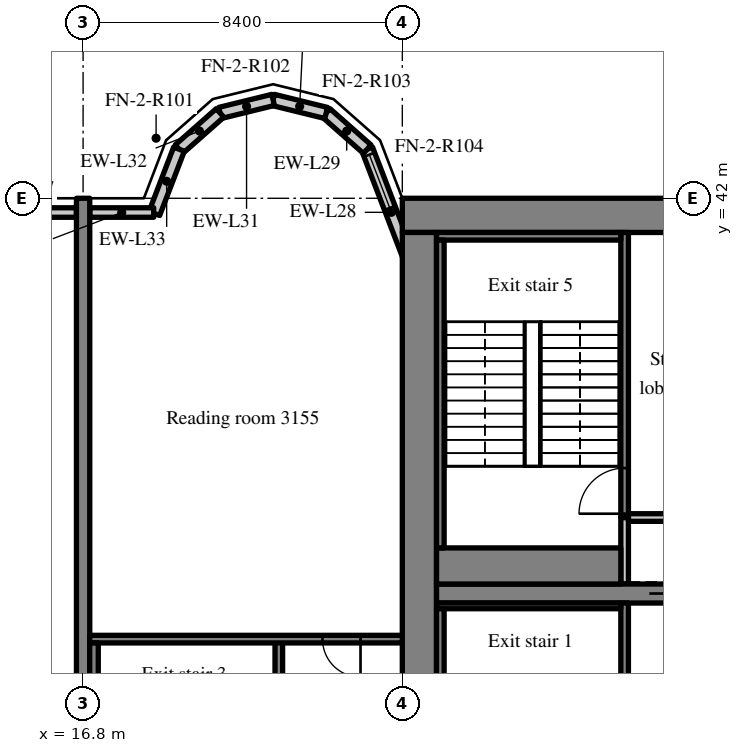
"""IFC4 building model, lengths in metres.
Left out: names, types, materials, properties, quantities, classifications, styles, units other than length and angle.
Written with IfcOpenShell. Run it as: python <this file> out.ifc"""

import sys

from ifc_helpers import new_model, si_unit, direction, frame, frame_2d, origin, place, context, subcontext, project, spatial, rectangle, extrude, source, transform, mapped, element, fill, save


model = new_model("IFC4")
c1 = context("Model", 3, precision=1e-05, world=origin(), true_north=direction((0.0, 1.0)))
c2 = subcontext(c1, "Body", "Model", "MODEL_VIEW")
j1 = project(units=[si_unit("LENGTHUNIT", "METRE"), si_unit("PLANEANGLEUNIT", "RADIAN")], contexts=[c1])
p1 = place(None, origin())
s1 = spatial("IfcSite", under=j1, at=p1, CompositionType="ELEMENT")
p2 = place(p1, origin())
s2 = spatial("IfcBuilding", under=s1, at=p2, CompositionType="ELEMENT")
p3 = place(p2, frame((0.0, 0.0, 129.4)))
s3 = spatial("IfcBuildingStorey", under=s2, at=p3, CompositionType="ELEMENT", Elevation=129.4)
m1 = source(origin(), c2, "Body", "SweptSolid", [
    extrude(rectangle(XDim=50.4, YDim=0.9, at=frame_2d((25.2, 0.0))), origin(), (0.0, 0.0, 1.0), 3.52),
])
p4 = place(p3, frame((25.2, 41.55, 0.0), z_axis=(0.0, 0.0, 1.0), x_axis=(1.0, 0.0, 0.0)))
e1 = element("IfcWall", 1, at=p4, inside=s3, PredefinedType="SHEAR", context=c2, shape_type="MappedRepresentation", body=[
    mapped(m1, transform((0.0, 0.0, 0.0), scale=1.0)),
])
m2 = source(origin(), c2, "Body", "SweptSolid", [
    extrude(rectangle(XDim=18.2, YDim=0.9, at=frame_2d((9.1, 0.0))), origin(), (0.0, 0.0, 1.0), 3.52),
])
p5 = place(p3, frame((25.65, 22.9, 0.0), z_axis=(0.0, 0.0, 1.0), x_axis=(0.0, 1.0, 0.0)))
e2 = element("IfcWall", 2, at=p5, inside=s3, PredefinedType="SHEAR", context=c2, shape_type="MappedRepresentation", body=[
    mapped(m2, transform((0.0, 0.0, 0.0), scale=1.0)),
])
m3 = source(origin(), c2, "Body", "SweptSolid", [
    extrude(rectangle(XDim=7.25, YDim=0.5, at=frame_2d((3.625, 0.0))), origin(), (0.0, 0.0, 1.0), 3.52),
])
p6 = place(p3, frame((26.1, 31.6, 0.0), z_axis=(0.0, 0.0, 1.0), x_axis=(1.0, 0.0, 0.0)))
e3 = element("IfcWall", 3, at=p6, inside=s3, PredefinedType="SHEAR", context=c2, shape_type="MappedRepresentation", body=[
    mapped(m3, transform((0.0, 0.0, 0.0), scale=1.0)),
])
m4 = source(origin(), c2, "Body", "SweptSolid", [
    extrude(rectangle(XDim=1.1, YDim=2.1, at=frame_2d((0.55, 1.05))), frame((0.0, 0.26, 0.0), z_axis=(0.0, -1.0, 0.0), x_axis=(1.0, 0.0, 0.0)), (0.0, 0.0, 1.0), 0.52),
])
p7 = place(p6, frame((5.6, 0.0, 0.0)))
e4 = element("IfcOpeningElement", 4, at=p7, cuts=e3, PredefinedType="OPENING", context=c2, shape_type="MappedRepresentation", body=[
    mapped(m4, transform((0.0, 0.0, 0.0), scale=1.0)),
])
m5 = source(origin(), c2, "Body", "SweptSolid", [
    extrude(rectangle(XDim=20.0, YDim=0.35, at=frame_2d((10.0, 0.0))), origin(), (0.0, 0.0, 1.0), 3.52),
])
p8 = place(p3, frame((16.8, 22.0, 0.0), z_axis=(0.0, 0.0, 1.0), x_axis=(0.0, 1.0, 0.0)))
e5 = element("IfcWall", 5, at=p8, inside=s3, PredefinedType="SHEAR", context=c2, shape_type="MappedRepresentation", body=[
    mapped(m5, transform((0.0, 0.0, 0.0), scale=1.0)),
])
m6 = source(origin(), c2, "Body", "SweptSolid", [
    extrude(rectangle(XDim=3.559, YDim=0.3, at=frame_2d((1.78, 0.0))), origin(), (0.0, 0.0, 1.0), 3.52),
])
p9 = place(p3, frame((25.55, 39.969, 0.0), z_axis=(0.0, 0.0, 1.0), x_axis=(-0.35779745313, 0.933799219604, 0.0)))
e6 = element("IfcWall", 6, at=p9, inside=s3, PredefinedType="SOLIDWALL", context=c2, shape_type="MappedRepresentation", body=[
    mapped(m6, transform((0.0, 0.0, 0.0), scale=1.0)),
])
m7 = source(origin(), c2, "Body", "SweptSolid", [
    extrude(rectangle(XDim=1.5, YDim=2.0, at=frame_2d((0.75, 1.0))), frame((0.0, 0.16, 0.0), z_axis=(0.0, -1.0, 0.0), x_axis=(1.0, 0.0, 0.0)), (0.0, 0.0, 1.0), 0.32),
])
p10 = place(p9, frame((1.903, 0.0, 0.9)))
e7 = element("IfcOpeningElement", 7, at=p10, cuts=e6, PredefinedType="OPENING", context=c2, shape_type="MappedRepresentation", body=[
    mapped(m7, transform((0.0, 0.0, 0.0), scale=1.0)),
])
m8 = source(origin(), c2, "Body", "SweptSolid", [
    extrude(rectangle(XDim=1.44, YDim=0.3, at=frame_2d((0.72, 0.0))), origin(), (0.0, 0.0, 1.0), 3.52),
])
p11 = place(p3, frame((24.277, 43.292, 0.0), z_axis=(0.0, 0.0, 1.0), x_axis=(-0.749649827867, 0.661834673902, 0.0)))
e8 = element("IfcWall", 8, at=p11, inside=s3, PredefinedType="SOLIDWALL", context=c2, shape_type="MappedRepresentation", body=[
    mapped(m8, transform((0.0, 0.0, 0.0), scale=1.0)),
])
m9 = source(origin(), c2, "Body", "SweptSolid", [
    extrude(rectangle(XDim=1.438, YDim=0.3, at=frame_2d((0.719, 0.0))), origin(), (0.0, 0.0, 1.0), 3.52),
])
p12 = place(p3, frame((23.197, 44.245, 0.0), z_axis=(0.0, 0.0, 1.0), x_axis=(-0.971152283879, 0.238460146601, 0.0)))
e9 = element("IfcWall", 9, at=p12, inside=s3, PredefinedType="SOLIDWALL", context=c2, shape_type="MappedRepresentation", body=[
    mapped(m9, transform((0.0, 0.0, 0.0), scale=1.0)),
])
m10 = source(origin(), c2, "Body", "SweptSolid", [
    extrude(rectangle(XDim=1.439, YDim=0.3, at=frame_2d((0.719, 0.0))), origin(), (0.0, 0.0, 1.0), 3.52),
])
p13 = place(p3, frame((21.8, 44.588, 0.0), z_axis=(0.0, 0.0, 1.0), x_axis=(-0.971161932466, -0.238420848351, 0.0)))
e10 = element("IfcWall", 10, at=p13, inside=s3, PredefinedType="SOLIDWALL", context=c2, shape_type="MappedRepresentation", body=[
    mapped(m10, transform((0.0, 0.0, 0.0), scale=1.0)),
])
m11 = source(origin(), c2, "Body", "SweptSolid", [
    extrude(rectangle(XDim=1.44, YDim=0.3, at=frame_2d((0.72, 0.0))), origin(), (0.0, 0.0, 1.0), 3.52),
])
p14 = place(p3, frame((20.403, 44.245, 0.0), z_axis=(0.0, 0.0, 1.0), x_axis=(-0.74957555648, -0.661918790432, 0.0)))
e11 = element("IfcWall", 11, at=p14, inside=s3, PredefinedType="SOLIDWALL", context=c2, shape_type="MappedRepresentation", body=[
    mapped(m11, transform((0.0, 0.0, 0.0), scale=1.0)),
])
m12 = source(origin(), c2, "Body", "SweptSolid", [
    extrude(rectangle(XDim=1.812, YDim=0.3, at=frame_2d((0.906, 0.0))), origin(), (0.0, 0.0, 1.0), 3.52),
])
p15 = place(p3, frame((19.323, 43.292, 0.0), z_axis=(0.0, 0.0, 1.0), x_axis=(-0.357877270961, -0.93376863244, 0.0)))
e12 = element("IfcWall", 12, at=p15, inside=s3, PredefinedType="SOLIDWALL", context=c2, shape_type="MappedRepresentation", body=[
    mapped(m12, transform((0.0, 0.0, 0.0), scale=1.0)),
])
m13 = source(origin(), c2, "Body", "SweptSolid", [
    extrude(rectangle(XDim=3.675, YDim=0.25, at=frame_2d((1.837, 0.0))), origin(), (0.0, 0.0, 1.0), 2.82),
])
p16 = place(p3, frame((16.625, 41.625, 0.0), z_axis=(0.0, 0.0, 1.0), x_axis=(-1.0, 0.0, 0.0)))
e13 = element("IfcWall", 13, at=p16, inside=s3, PredefinedType="SOLIDWALL", context=c2, shape_type="MappedRepresentation", body=[
    mapped(m13, transform((0.0, 0.0, 0.0), scale=1.0)),
])
m14 = source(origin(), c2, "Body", "SweptSolid", [
    extrude(rectangle(XDim=1.5, YDim=1.5, at=frame_2d((0.75, 0.75))), frame((0.0, 0.135, 0.0), z_axis=(0.0, -1.0, 0.0), x_axis=(1.0, 0.0, 0.0)), (0.0, 0.0, 1.0), 0.27),
])
p17 = place(p16, frame((1.087, 0.0, 0.9)))
e14 = element("IfcOpeningElement", 14, at=p17, cuts=e13, PredefinedType="OPENING", context=c2, shape_type="MappedRepresentation", body=[
    mapped(m14, transform((0.0, 0.0, 0.0), scale=1.0)),
])
m15 = source(origin(), c2, "Body", "SweptSolid", [
    extrude(rectangle(XDim=1.683, YDim=0.25, at=frame_2d((0.841, 0.0))), origin(), (0.0, 0.0, 1.0), 2.82),
])
p18 = place(p3, frame((18.658, 41.625, 0.0), z_axis=(0.0, 0.0, 1.0), x_axis=(-1.0, 0.0, 0.0)))
e15 = element("IfcWall", 15, at=p18, inside=s3, PredefinedType="SOLIDWALL", context=c2, shape_type="MappedRepresentation", body=[
    mapped(m15, transform((0.0, 0.0, 0.0), scale=1.0)),
])
m16 = source(origin(), c2, "Body", "SweptSolid", [
    extrude(rectangle(XDim=8.45, YDim=0.2, at=frame_2d((4.225, 0.0))), origin(), (0.0, 0.0, 1.0), 3.52),
])
p19 = place(p3, frame((31.05, 22.9, 0.0), z_axis=(0.0, 0.0, 1.0), x_axis=(0.0, 1.0, 0.0)))
e16 = element("IfcWall", 16, at=p19, inside=s3, PredefinedType="SOLIDWALL", context=c2, shape_type="MappedRepresentation", body=[
    mapped(m16, transform((0.0, 0.0, 0.0), scale=1.0)),
])
m17 = source(origin(), c2, "Body", "SweptSolid", [
    extrude(rectangle(XDim=1.2, YDim=2.1, at=frame_2d((0.6, 1.05))), frame((0.0, 0.11, 0.0), z_axis=(0.0, -1.0, 0.0), x_axis=(1.0, 0.0, 0.0)), (0.0, 0.0, 1.0), 0.22),
])
p20 = place(p19, frame((0.7, 0.0, 0.0)))
e17 = element("IfcOpeningElement", 17, at=p20, cuts=e16, PredefinedType="OPENING", context=c2, shape_type="MappedRepresentation", body=[
    mapped(m17, transform((0.0, 0.0, 0.0), scale=1.0)),
])
m18 = source(origin(), c2, "Body", "SweptSolid", [
    extrude(rectangle(XDim=1.75, YDim=0.2, at=frame_2d((0.875, 0.0))), origin(), (0.0, 0.0, 1.0), 3.52),
])
p21 = place(p3, frame((31.05, 31.85, 0.0), z_axis=(0.0, 0.0, 1.0), x_axis=(0.0, 1.0, 0.0)))
e18 = element("IfcWall", 18, at=p21, inside=s3, PredefinedType="SOLIDWALL", context=c2, shape_type="MappedRepresentation", body=[
    mapped(m18, transform((0.0, 0.0, 0.0), scale=1.0)),
])
m19 = source(origin(), c2, "Body", "SweptSolid", [
    extrude(rectangle(XDim=2.2, YDim=0.2, at=frame_2d((1.1, 0.0))), origin(), (0.0, 0.0, 1.0), 3.52),
])
p22 = place(p3, frame((31.15, 33.6, 0.0), z_axis=(0.0, 0.0, 1.0), x_axis=(1.0, 0.0, 0.0)))
e19 = element("IfcWall", 19, at=p22, inside=s3, PredefinedType="SOLIDWALL", context=c2, shape_type="MappedRepresentation", body=[
    mapped(m19, transform((0.0, 0.0, 0.0), scale=1.0)),
])
m20 = source(origin(), c2, "Body", "SweptSolid", [
    extrude(rectangle(XDim=7.5, YDim=0.2, at=frame_2d((3.75, 0.0))), origin(), (0.0, 0.0, 1.0), 3.52),
])
p23 = place(p3, frame((31.05, 33.6, 0.0), z_axis=(0.0, 0.0, 1.0), x_axis=(0.0, 1.0, 0.0)))
e20 = element("IfcWall", 20, at=p23, inside=s3, PredefinedType="SOLIDWALL", context=c2, shape_type="MappedRepresentation", body=[
    mapped(m20, transform((0.0, 0.0, 0.0), scale=1.0)),
])
p24 = place(p23, frame((0.1, 0.0, 0.0)))
e21 = element("IfcOpeningElement", 21, at=p24, cuts=e20, PredefinedType="OPENING", context=c2, shape_type="MappedRepresentation", body=[
    mapped(m17, transform((0.0, 0.0, 0.0), scale=1.0)),
])
m21 = source(origin(), c2, "Body", "SweptSolid", [
    extrude(rectangle(XDim=8.3, YDim=0.2, at=frame_2d((4.15, 0.0))), origin(), (0.0, 0.0, 1.0), 3.52),
])
p25 = place(p3, frame((21.95, 22.1, 0.0), z_axis=(0.0, 0.0, 1.0), x_axis=(0.0, 1.0, 0.0)))
e22 = element("IfcWall", 22, at=p25, inside=s3, PredefinedType="SOLIDWALL", context=c2, shape_type="MappedRepresentation", body=[
    mapped(m21, transform((0.0, 0.0, 0.0), scale=1.0)),
])
p26 = place(p25, frame((0.6, 0.0, 0.0)))
e23 = element("IfcOpeningElement", 23, at=p26, cuts=e22, PredefinedType="OPENING", context=c2, shape_type="MappedRepresentation", body=[
    mapped(m17, transform((0.0, 0.0, 0.0), scale=1.0)),
])
m22 = source(origin(), c2, "Body", "SweptSolid", [
    extrude(rectangle(XDim=8.225, YDim=0.2, at=frame_2d((4.112, 0.0))), origin(), (0.0, 0.0, 1.0), 3.52),
])
p27 = place(p3, frame((16.975, 30.4, 0.0), z_axis=(0.0, 0.0, 1.0), x_axis=(1.0, 0.0, 0.0)))
e24 = element("IfcWall", 24, at=p27, inside=s3, PredefinedType="SOLIDWALL", context=c2, shape_type="MappedRepresentation", body=[
    mapped(m22, transform((0.0, 0.0, 0.0), scale=1.0)),
])
m23 = source(origin(), c2, "Body", "SweptSolid", [
    extrude(rectangle(XDim=1.0, YDim=2.1, at=frame_2d((0.5, 1.05))), frame((0.0, 0.11, 0.0), z_axis=(0.0, -1.0, 0.0), x_axis=(1.0, 0.0, 0.0)), (0.0, 0.0, 1.0), 0.22),
])
p28 = place(p27, frame((6.125, 0.0, 0.0)))
e25 = element("IfcOpeningElement", 25, at=p28, cuts=e24, PredefinedType="OPENING", context=c2, shape_type="MappedRepresentation", body=[
    mapped(m23, transform((0.0, 0.0, 0.0), scale=1.0)),
])
m24 = source(origin(), c2, "Body", "SweptSolid", [
    extrude(rectangle(XDim=4.85, YDim=0.15, at=frame_2d((2.425, 0.0))), origin(), (0.0, 0.0, 1.0), 3.52),
])
p29 = place(p3, frame((26.1, 31.275, 0.0), z_axis=(0.0, 0.0, 1.0), x_axis=(1.0, 0.0, 0.0)))
e26 = element("IfcWall", 26, at=p29, inside=s3, PredefinedType="SOLIDWALL", context=c2, shape_type="MappedRepresentation", body=[
    mapped(m24, transform((0.0, 0.0, 0.0), scale=1.0)),
])
m25 = source(origin(), c2, "Body", "SweptSolid", [
    extrude(rectangle(XDim=8.1, YDim=0.2, at=frame_2d((4.05, 0.0))), origin(), (0.0, 0.0, 1.0), 3.52),
])
p30 = place(p3, frame((26.2, 23.1, 0.0), z_axis=(0.0, 0.0, 1.0), x_axis=(0.0, 1.0, 0.0)))
e27 = element("IfcWall", 27, at=p30, inside=s3, PredefinedType="SOLIDWALL", context=c2, shape_type="MappedRepresentation", body=[
    mapped(m25, transform((0.0, 0.0, 0.0), scale=1.0)),
])
m26 = source(origin(), c2, "Body", "SweptSolid", [
    extrude(rectangle(XDim=8.1, YDim=0.225, at=frame_2d((4.05, 0.0))), origin(), (0.0, 0.0, 1.0), 3.52),
])
p31 = place(p3, frame((17.087, 22.2, 0.0), z_axis=(0.0, 0.0, 1.0), x_axis=(0.0, 1.0, 0.0)))
e28 = element("IfcWall", 28, at=p31, inside=s3, PredefinedType="SOLIDWALL", context=c2, shape_type="MappedRepresentation", body=[
    mapped(m26, transform((0.0, 0.0, 0.0), scale=1.0)),
])
m27 = source(origin(), c2, "Body", "SweptSolid", [
    extrude(rectangle(XDim=4.85, YDim=0.2, at=frame_2d((2.425, 0.0))), origin(), (0.0, 0.0, 1.0), 3.52),
])
p32 = place(p3, frame((26.1, 41.0, 0.0), z_axis=(0.0, 0.0, 1.0), x_axis=(1.0, 0.0, 0.0)))
e29 = element("IfcWall", 29, at=p32, inside=s3, PredefinedType="SOLIDWALL", context=c2, shape_type="MappedRepresentation", body=[
    mapped(m27, transform((0.0, 0.0, 0.0), scale=1.0)),
])
m28 = source(origin(), c2, "Body", "SweptSolid", [
    extrude(rectangle(XDim=4.85, YDim=0.95, at=frame_2d((2.425, 0.0))), origin(), (0.0, 0.0, 1.0), 3.52),
])
p33 = place(p3, frame((26.1, 32.325, 0.0), z_axis=(0.0, 0.0, 1.0), x_axis=(1.0, 0.0, 0.0)))
e30 = element("IfcWall", 30, at=p33, inside=s3, PredefinedType="SOLIDWALL", context=c2, shape_type="MappedRepresentation", body=[
    mapped(m28, transform((0.0, 0.0, 0.0), scale=1.0)),
])
p34 = place(p3, frame((26.2, 32.8, 0.0), z_axis=(0.0, 0.0, 1.0), x_axis=(0.0, 1.0, 0.0)))
e31 = element("IfcWall", 31, at=p34, inside=s3, PredefinedType="SOLIDWALL", context=c2, shape_type="MappedRepresentation", body=[
    mapped(m25, transform((0.0, 0.0, 0.0), scale=1.0)),
])
m29 = source(origin(), c2, "Body", "SweptSolid", [
    extrude(rectangle(XDim=1.5, YDim=2.0, at=frame_2d((0.75, 1.0))), frame((0.0, 0.03, 0.0), z_axis=(0.0, -1.0, 0.0), x_axis=(1.0, 0.0, 0.0)), (0.0, 0.0, 1.0), 0.06),
])
p35 = place(p10, origin())
e32 = element("IfcWindow", 32, at=p35, inside=s3, PartitioningType="SINGLE_PANEL", PredefinedType="WINDOW", context=c2, shape_type="MappedRepresentation", body=[
    mapped(m29, transform((0.0, 0.0, 0.0), scale=1.0)),
])
fill(e7, e32)
m30 = source(origin(), c2, "Body", "SweptSolid", [
    extrude(rectangle(XDim=1.1, YDim=2.1, at=frame_2d((0.55, 1.05))), frame((0.0, 0.025, 0.0), z_axis=(0.0, -1.0, 0.0), x_axis=(1.0, 0.0, 0.0)), (0.0, 0.0, 1.0), 0.05),
])
p36 = place(p7, origin())
e33 = element("IfcDoor", 33, at=p36, inside=s3, OperationType="SLIDING_TO_LEFT", PredefinedType="DOOR", context=c2, shape_type="MappedRepresentation", body=[
    mapped(m30, transform((0.0, 0.0, 0.0), scale=1.0)),
])
fill(e4, e33)
m31 = source(origin(), c2, "Body", "SweptSolid", [
    extrude(rectangle(XDim=1.2, YDim=2.1, at=frame_2d((0.6, 1.05))), frame((0.0, 0.025, 0.0), z_axis=(0.0, -1.0, 0.0), x_axis=(1.0, 0.0, 0.0)), (0.0, 0.0, 1.0), 0.05),
])
p37 = place(p24, origin())
e34 = element("IfcDoor", 34, at=p37, inside=s3, OperationType="SINGLE_SWING_LEFT", PredefinedType="DOOR", context=c2, shape_type="MappedRepresentation", body=[
    mapped(m31, transform((0.0, 0.0, 0.0), scale=1.0)),
])
fill(e21, e34)
m32 = source(origin(), c2, "Body", "SweptSolid", [
    extrude(rectangle(XDim=1.0, YDim=2.1, at=frame_2d((0.5, 1.05))), frame((0.0, 0.025, 0.0), z_axis=(0.0, -1.0, 0.0), x_axis=(1.0, 0.0, 0.0)), (0.0, 0.0, 1.0), 0.05),
])
p38 = place(p28, origin())
e35 = element("IfcDoor", 35, at=p38, inside=s3, OperationType="SINGLE_SWING_RIGHT", PredefinedType="DOOR", context=c2, shape_type="MappedRepresentation", body=[
    mapped(m32, transform((0.0, 0.0, 0.0), scale=1.0)),
])
fill(e25, e35)
save(model, sys.argv[1])
